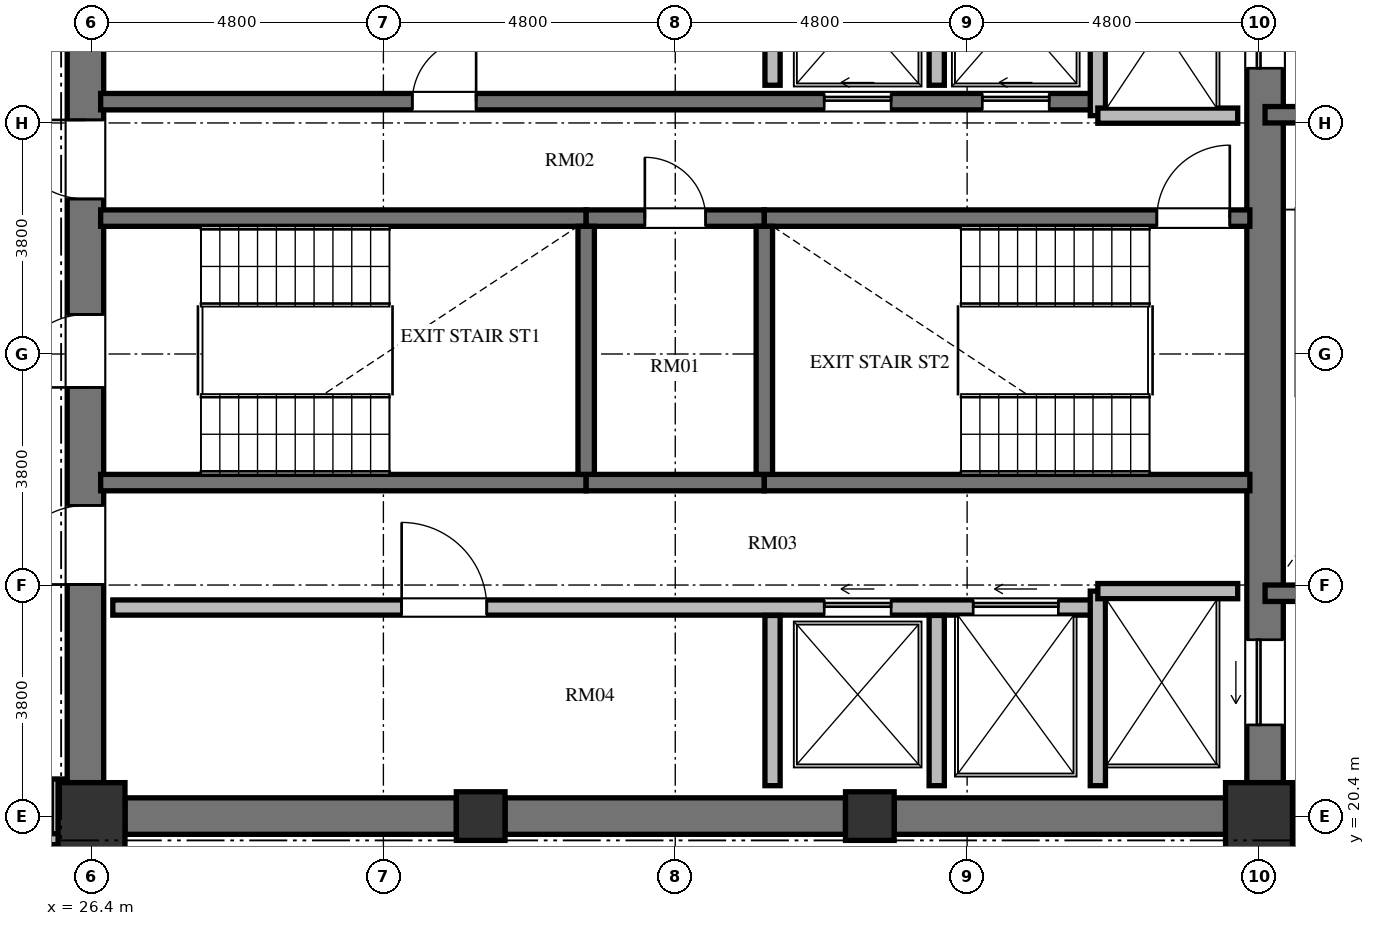
"""IFC4 building model, lengths in metres.
Left out: names, types, materials, properties, quantities, classifications, styles, units other than length and angle.
Written with IfcOpenShell. Run it as: python <this file> out.ifc"""

import sys

from ifc_helpers import new_model, si_unit, direction, frame, frame_2d, origin, origin_2d, place, context, subcontext, project, spatial, rectangle, extrude, element, fill, save


model = new_model("IFC4")
c1 = context("Model", 3, precision=1e-05, world=origin(), true_north=direction((0.0, 1.0)))
c2 = subcontext(c1, "Body", "Model", "MODEL_VIEW")
j1 = project(units=[si_unit("LENGTHUNIT", "METRE"), si_unit("PLANEANGLEUNIT", "RADIAN")], contexts=[c1])
p1 = place(None, origin())
s1 = spatial("IfcSite", under=j1, at=p1, CompositionType="ELEMENT")
p2 = place(p1, origin())
s2 = spatial("IfcBuilding", under=s1, at=p2, CompositionType="ELEMENT")
p3 = place(p2, frame((0.0, 0.0, 198.48)))
s3 = spatial("IfcBuildingStorey", under=s2, at=p3, CompositionType="ELEMENT", Elevation=198.48)
p4 = place(p3, frame((26.4, 20.4, 0.0), z_axis=(0.0, 0.0, 1.0), x_axis=(1.0, 0.0, 0.0)))
e1 = element("IfcColumn", 1, at=p4, inside=s3, PredefinedType="COLUMN", context=c2, shape_type="SweptSolid", body=[
    extrude(rectangle(XDim=1.1, YDim=1.1, at=origin_2d()), origin(), (0.0, 0.0, 1.0), 3.648),
])
for number, where, z_axis, x_axis in (
    (2, (32.8, 20.4, 0.0), (0.0, 0.0, 1.0), (1.0, 0.0, 0.0)),
    (3, (39.2, 20.4, 0.0), (0.0, 0.0, 1.0), (1.0, 0.0, 0.0)),
):
    element("IfcColumn", number, at=place(p3, frame(where, z_axis=z_axis, x_axis=x_axis)), inside=s3, PredefinedType="COLUMN", context=c2, shape_type="SweptSolid", body=[
        extrude(rectangle(XDim=0.8, YDim=0.8, at=origin_2d()), origin(), (0.0, 0.0, 1.0), 3.648),
    ])
p5 = place(p3, frame((45.6, 20.4, 0.0), z_axis=(0.0, 0.0, 1.0), x_axis=(1.0, 0.0, 0.0)))
e4 = element("IfcColumn", 4, at=p5, inside=s3, PredefinedType="COLUMN", context=c2, shape_type="SweptSolid", body=[
    extrude(rectangle(XDim=1.1, YDim=1.1, at=origin_2d()), origin(), (0.0, 0.0, 1.0), 3.648),
])
p6 = place(p3, frame((26.3, 20.95, 0.0), z_axis=(0.0, 0.0, 1.0), x_axis=(0.0, 1.0, 0.0)))
e5 = element("IfcWall", 5, at=p6, inside=s3, PredefinedType="SHEAR", context=c2, shape_type="SweptSolid", body=[
    extrude(rectangle(XDim=14.1, YDim=0.6, at=frame_2d((7.05, 0.0))), origin(), (0.0, 0.0, 1.0), 3.648),
])
p7 = place(p6, frame((6.5, 0.0, 0.0)))
e6 = element("IfcOpeningElement", 6, at=p7, cuts=e5, PredefinedType="OPENING", context=c2, shape_type="SweptSolid", body=[
    extrude(rectangle(XDim=1.2, YDim=2.15, at=frame_2d((0.6, 1.075))), frame((0.0, 0.31, 0.0), z_axis=(0.0, -1.0, 0.0), x_axis=(1.0, 0.0, 0.0)), (0.0, 0.0, 1.0), 0.62),
])
p8 = place(p6, frame((9.6, 0.0, 0.0)))
e7 = element("IfcOpeningElement", 7, at=p8, cuts=e5, PredefinedType="OPENING", context=c2, shape_type="SweptSolid", body=[
    extrude(rectangle(XDim=1.3, YDim=2.2, at=frame_2d((0.65, 1.1))), frame((0.0, 0.31, 0.0), z_axis=(0.0, -1.0, 0.0), x_axis=(1.0, 0.0, 0.0)), (0.0, 0.0, 1.0), 0.62),
])
p9 = place(p6, frame((3.26, 0.0, 0.0)))
e8 = element("IfcOpeningElement", 8, at=p9, cuts=e5, PredefinedType="OPENING", context=c2, shape_type="SweptSolid", body=[
    extrude(rectangle(XDim=1.3, YDim=2.2, at=frame_2d((0.65, 1.1))), frame((0.0, 0.31, 0.0), z_axis=(0.0, -1.0, 0.0), x_axis=(1.0, 0.0, 0.0)), (0.0, 0.0, 1.0), 0.62),
])
p10 = place(p3, frame((45.7, 20.95, 0.0), z_axis=(0.0, 0.0, 1.0), x_axis=(0.0, 1.0, 0.0)))
e9 = element("IfcWall", 9, at=p10, inside=s3, PredefinedType="SHEAR", context=c2, shape_type="SweptSolid", body=[
    extrude(rectangle(XDim=14.1, YDim=0.6, at=frame_2d((7.05, 0.0))), origin(), (0.0, 0.0, 1.0), 3.648),
])
p11 = place(p10, frame((11.75, 0.0, 0.0)))
e10 = element("IfcOpeningElement", 10, at=p11, cuts=e9, PredefinedType="OPENING", context=c2, shape_type="SweptSolid", body=[
    extrude(rectangle(XDim=1.4, YDim=2.3, at=frame_2d((0.7, 1.15))), frame((0.0, 0.31, 0.0), z_axis=(0.0, -1.0, 0.0), x_axis=(1.0, 0.0, 0.0)), (0.0, 0.0, 1.0), 0.62),
])
p12 = place(p10, frame((0.95, 0.0, 0.0)))
e11 = element("IfcOpeningElement", 11, at=p12, cuts=e9, PredefinedType="OPENING", context=c2, shape_type="SweptSolid", body=[
    extrude(rectangle(XDim=1.4, YDim=2.3, at=frame_2d((0.7, 1.15))), frame((0.0, 0.31, 0.0), z_axis=(0.0, -1.0, 0.0), x_axis=(1.0, 0.0, 0.0)), (0.0, 0.0, 1.0), 0.62),
])
p13 = place(p3, frame((26.95, 20.4, 0.0), z_axis=(0.0, 0.0, 1.0), x_axis=(1.0, 0.0, 0.0)))
e12 = element("IfcWall", 12, at=p13, inside=s3, PredefinedType="SHEAR", context=c2, shape_type="SweptSolid", body=[
    extrude(rectangle(XDim=5.45, YDim=0.6, at=frame_2d((2.725, 0.0))), origin(), (0.0, 0.0, 1.0), 3.648),
])
p14 = place(p3, frame((33.2, 20.4, 0.0), z_axis=(0.0, 0.0, 1.0), x_axis=(1.0, 0.0, 0.0)))
e13 = element("IfcWall", 13, at=p14, inside=s3, PredefinedType="SHEAR", context=c2, shape_type="SweptSolid", body=[
    extrude(rectangle(XDim=5.6, YDim=0.6, at=frame_2d((2.8, 0.0))), origin(), (0.0, 0.0, 1.0), 3.648),
])
p15 = place(p3, frame((39.6, 20.4, 0.0), z_axis=(0.0, 0.0, 1.0), x_axis=(1.0, 0.0, 0.0)))
e14 = element("IfcWall", 14, at=p15, inside=s3, PredefinedType="SHEAR", context=c2, shape_type="SweptSolid", body=[
    extrude(rectangle(XDim=5.45, YDim=0.6, at=frame_2d((2.725, 0.0))), origin(), (0.0, 0.0, 1.0), 3.648),
])
p16 = place(p3, frame((26.55, 30.235, 0.0), z_axis=(0.0, 0.0, 1.0), x_axis=(1.0, 0.0, 0.0)))
e15 = element("IfcWall", 15, at=p16, inside=s3, PredefinedType="SHEAR", context=c2, shape_type="SweptSolid", body=[
    extrude(rectangle(XDim=7.985, YDim=0.27, at=frame_2d((3.992, 0.0))), origin(), (0.0, 0.0, 1.0), 3.648),
])
p17 = place(p3, frame((34.535, 30.235, 0.0), z_axis=(0.0, 0.0, 1.0), x_axis=(1.0, 0.0, 0.0)))
e16 = element("IfcWall", 16, at=p17, inside=s3, PredefinedType="SHEAR", context=c2, shape_type="SweptSolid", body=[
    extrude(rectangle(XDim=2.93, YDim=0.27, at=frame_2d((1.465, 0.0))), origin(), (0.0, 0.0, 1.0), 3.648),
])
p18 = place(p17, frame((0.965, 0.0, 0.0)))
e17 = element("IfcOpeningElement", 17, at=p18, cuts=e16, PredefinedType="OPENING", context=c2, shape_type="SweptSolid", body=[
    extrude(rectangle(XDim=1.0, YDim=2.1, at=frame_2d((0.5, 1.05))), frame((0.0, 0.145, 0.0), z_axis=(0.0, -1.0, 0.0), x_axis=(1.0, 0.0, 0.0)), (0.0, 0.0, 1.0), 0.29),
])
p19 = place(p3, frame((37.465, 30.235, 0.0), z_axis=(0.0, 0.0, 1.0), x_axis=(1.0, 0.0, 0.0)))
e18 = element("IfcWall", 18, at=p19, inside=s3, PredefinedType="SHEAR", context=c2, shape_type="SweptSolid", body=[
    extrude(rectangle(XDim=7.985, YDim=0.27, at=frame_2d((3.992, 0.0))), origin(), (0.0, 0.0, 1.0), 3.648),
])
p20 = place(p19, frame((6.455, 0.0, 0.0)))
e19 = element("IfcOpeningElement", 19, at=p20, cuts=e18, PredefinedType="OPENING", context=c2, shape_type="SweptSolid", body=[
    extrude(rectangle(XDim=1.2, YDim=2.15, at=frame_2d((0.6, 1.075))), frame((0.0, 0.145, 0.0), z_axis=(0.0, -1.0, 0.0), x_axis=(1.0, 0.0, 0.0)), (0.0, 0.0, 1.0), 0.29),
])
p21 = place(p3, frame((26.55, 25.885, 0.0), z_axis=(0.0, 0.0, 1.0), x_axis=(1.0, 0.0, 0.0)))
e20 = element("IfcWall", 20, at=p21, inside=s3, PredefinedType="SHEAR", context=c2, shape_type="SweptSolid", body=[
    extrude(rectangle(XDim=7.985, YDim=0.27, at=frame_2d((3.992, 0.0))), origin(), (0.0, 0.0, 1.0), 3.648),
])
p22 = place(p3, frame((34.535, 25.885, 0.0), z_axis=(0.0, 0.0, 1.0), x_axis=(1.0, 0.0, 0.0)))
e21 = element("IfcWall", 21, at=p22, inside=s3, PredefinedType="SHEAR", context=c2, shape_type="SweptSolid", body=[
    extrude(rectangle(XDim=2.93, YDim=0.27, at=frame_2d((1.465, 0.0))), origin(), (0.0, 0.0, 1.0), 3.648),
])
p23 = place(p3, frame((37.465, 25.885, 0.0), z_axis=(0.0, 0.0, 1.0), x_axis=(1.0, 0.0, 0.0)))
e22 = element("IfcWall", 22, at=p23, inside=s3, PredefinedType="SHEAR", context=c2, shape_type="SweptSolid", body=[
    extrude(rectangle(XDim=7.985, YDim=0.27, at=frame_2d((3.992, 0.0))), origin(), (0.0, 0.0, 1.0), 3.648),
])
for number, where, z_axis, x_axis in (
    (23, (34.535, 26.02, 0.0), (0.0, 0.0, 1.0), (0.0, 1.0, 0.0)),
    (24, (37.465, 26.02, 0.0), (0.0, 0.0, 1.0), (0.0, 1.0, 0.0)),
):
    element("IfcWall", number, at=place(p3, frame(where, z_axis=z_axis, x_axis=x_axis)), inside=s3, PredefinedType="SHEAR", context=c2, shape_type="SweptSolid", body=[
        extrude(rectangle(XDim=4.08, YDim=0.27, at=frame_2d((2.04, 0.0))), origin(), (0.0, 0.0, 1.0), 3.648),
    ])
p24 = place(p3, frame((26.55, 32.15, 0.0), z_axis=(0.0, 0.0, 1.0), x_axis=(1.0, 0.0, 0.0)))
e25 = element("IfcWall", 25, at=p24, inside=s3, PredefinedType="SHEAR", context=c2, shape_type="SweptSolid", body=[
    extrude(rectangle(XDim=16.4, YDim=0.27, at=frame_2d((8.2, 0.0))), origin(), (0.0, 0.0, 1.0), 3.648),
])
p25 = place(p24, frame((5.125, 0.0, 0.0)))
e26 = element("IfcOpeningElement", 26, at=p25, cuts=e25, PredefinedType="OPENING", context=c2, shape_type="SweptSolid", body=[
    extrude(rectangle(XDim=1.05, YDim=2.15, at=frame_2d((0.525, 1.075))), frame((0.0, 0.145, 0.0), z_axis=(0.0, -1.0, 0.0), x_axis=(1.0, 0.0, 0.0)), (0.0, 0.0, 1.0), 0.29),
])
p26 = place(p24, frame((11.9, 0.0, 0.0)))
e27 = element("IfcOpeningElement", 27, at=p26, cuts=e25, PredefinedType="OPENING", context=c2, shape_type="SweptSolid", body=[
    extrude(rectangle(XDim=1.1, YDim=2.2, at=frame_2d((0.55, 1.1))), frame((0.0, 0.145, 0.0), z_axis=(0.0, -1.0, 0.0), x_axis=(1.0, 0.0, 0.0)), (0.0, 0.0, 1.0), 0.29),
])
p27 = place(p24, frame((14.5, 0.0, 0.0)))
e28 = element("IfcOpeningElement", 28, at=p27, cuts=e25, PredefinedType="OPENING", context=c2, shape_type="SweptSolid", body=[
    extrude(rectangle(XDim=1.1, YDim=2.2, at=frame_2d((0.55, 1.1))), frame((0.0, 0.145, 0.0), z_axis=(0.0, -1.0, 0.0), x_axis=(1.0, 0.0, 0.0)), (0.0, 0.0, 1.0), 0.29),
])
p28 = place(p3, frame((26.75, 23.83, 0.0), z_axis=(0.0, 0.0, 1.0), x_axis=(1.0, 0.0, 0.0)))
e29 = element("IfcWall", 29, at=p28, inside=s3, PredefinedType="SOLIDWALL", context=c2, shape_type="SweptSolid", body=[
    extrude(rectangle(XDim=16.2, YDim=0.25, at=frame_2d((8.1, 0.0))), origin(), (0.0, 0.0, 1.0), 3.448),
])
p29 = place(p28, frame((4.75, 0.0, 0.0)))
e30 = element("IfcOpeningElement", 30, at=p29, cuts=e29, PredefinedType="OPENING", context=c2, shape_type="SweptSolid", body=[
    extrude(rectangle(XDim=1.4, YDim=2.2, at=frame_2d((0.7, 1.1))), frame((0.0, 0.135, 0.0), z_axis=(0.0, -1.0, 0.0), x_axis=(1.0, 0.0, 0.0)), (0.0, 0.0, 1.0), 0.27),
])
p30 = place(p28, frame((11.7, 0.0, 0.0)))
e31 = element("IfcOpeningElement", 31, at=p30, cuts=e29, PredefinedType="OPENING", context=c2, shape_type="SweptSolid", body=[
    extrude(rectangle(XDim=1.1, YDim=2.2, at=frame_2d((0.55, 1.1))), frame((0.0, 0.135, 0.0), z_axis=(0.0, -1.0, 0.0), x_axis=(1.0, 0.0, 0.0)), (0.0, 0.0, 1.0), 0.27),
])
p31 = place(p28, frame((14.15, 0.0, 0.0)))
e32 = element("IfcOpeningElement", 32, at=p31, cuts=e29, PredefinedType="OPENING", context=c2, shape_type="SweptSolid", body=[
    extrude(rectangle(XDim=1.4, YDim=2.3, at=frame_2d((0.7, 1.15))), frame((0.0, 0.135, 0.0), z_axis=(0.0, -1.0, 0.0), x_axis=(1.0, 0.0, 0.0)), (0.0, 0.0, 1.0), 0.27),
])
p32 = place(p3, frame((42.95, 31.92, 0.0), z_axis=(0.0, 0.0, 1.0), x_axis=(0.0, 1.0, 0.0)))
e33 = element("IfcWall", 33, at=p32, inside=s3, PredefinedType="SOLIDWALL", context=c2, shape_type="SweptSolid", body=[
    extrude(rectangle(XDim=3.18, YDim=0.25, at=frame_2d((1.59, 0.0))), origin(), (0.0, 0.0, 1.0), 3.448),
])
p33 = place(p3, frame((42.95, 31.92, 0.0), z_axis=(0.0, 0.0, 1.0), x_axis=(1.0, 0.0, 0.0)))
e34 = element("IfcWall", 34, at=p33, inside=s3, PredefinedType="SOLIDWALL", context=c2, shape_type="SweptSolid", body=[
    extrude(rectangle(XDim=2.3, YDim=0.25, at=frame_2d((1.15, 0.0))), origin(), (0.0, 0.0, 1.0), 3.448),
])
p34 = place(p3, frame((42.95, 20.9, 0.0), z_axis=(0.0, 0.0, 1.0), x_axis=(0.0, 1.0, 0.0)))
e35 = element("IfcWall", 35, at=p34, inside=s3, PredefinedType="SOLIDWALL", context=c2, shape_type="SweptSolid", body=[
    extrude(rectangle(XDim=3.2, YDim=0.25, at=frame_2d((1.6, 0.0))), origin(), (0.0, 0.0, 1.0), 3.448),
])
p35 = place(p3, frame((42.95, 24.1, 0.0), z_axis=(0.0, 0.0, 1.0), x_axis=(1.0, 0.0, 0.0)))
e36 = element("IfcWall", 36, at=p35, inside=s3, PredefinedType="SOLIDWALL", context=c2, shape_type="SweptSolid", body=[
    extrude(rectangle(XDim=2.3, YDim=0.25, at=frame_2d((1.15, 0.0))), origin(), (0.0, 0.0, 1.0), 3.448),
])
p36 = place(p3, frame((37.6, 32.42, 0.0), z_axis=(0.0, 0.0, 1.0), x_axis=(0.0, 1.0, 0.0)))
e37 = element("IfcWall", 37, at=p36, inside=s3, PredefinedType="SOLIDWALL", context=c2, shape_type="SweptSolid", body=[
    extrude(rectangle(XDim=2.68, YDim=0.25, at=frame_2d((1.34, 0.0))), origin(), (0.0, 0.0, 1.0), 3.448),
])
p37 = place(p3, frame((37.6, 20.9, 0.0), z_axis=(0.0, 0.0, 1.0), x_axis=(0.0, 1.0, 0.0)))
e38 = element("IfcWall", 38, at=p37, inside=s3, PredefinedType="SOLIDWALL", context=c2, shape_type="SweptSolid", body=[
    extrude(rectangle(XDim=2.8, YDim=0.25, at=frame_2d((1.4, 0.0))), origin(), (0.0, 0.0, 1.0), 3.448),
])
p38 = place(p3, frame((40.3, 32.42, 0.0), z_axis=(0.0, 0.0, 1.0), x_axis=(0.0, 1.0, 0.0)))
e39 = element("IfcWall", 39, at=p38, inside=s3, PredefinedType="SOLIDWALL", context=c2, shape_type="SweptSolid", body=[
    extrude(rectangle(XDim=2.68, YDim=0.25, at=frame_2d((1.34, 0.0))), origin(), (0.0, 0.0, 1.0), 3.448),
])
p39 = place(p3, frame((40.3, 20.9, 0.0), z_axis=(0.0, 0.0, 1.0), x_axis=(0.0, 1.0, 0.0)))
e40 = element("IfcWall", 40, at=p39, inside=s3, PredefinedType="SOLIDWALL", context=c2, shape_type="SweptSolid", body=[
    extrude(rectangle(XDim=2.8, YDim=0.25, at=frame_2d((1.4, 0.0))), origin(), (0.0, 0.0, 1.0), 3.448),
])
for number, where, z_axis, x_axis in (
    (41, (45.7, 31.935, 0.0), (0.0, 0.0, 1.0), (1.0, 0.0, 0.0)),
    (42, (45.7, 24.065, 0.0), (0.0, 0.0, 1.0), (1.0, 0.0, 0.0)),
):
    element("IfcWall", number, at=place(p3, frame(where, z_axis=z_axis, x_axis=x_axis)), inside=s3, PredefinedType="SHEAR", context=c2, shape_type="SweptSolid", body=[
        extrude(rectangle(XDim=4.715, YDim=0.27, at=frame_2d((2.357, 0.0))), origin(), (0.0, 0.0, 1.0), 3.648),
    ])
p40 = place(p3, frame((45.7, 20.02, 0.0), z_axis=(0.0, 0.0, 1.0), x_axis=(1.0, 0.0, 0.0)))
e43 = element("IfcWall", 43, at=p40, inside=s3, PredefinedType="SOLIDWALL", context=c2, shape_type="SweptSolid", body=[
    extrude(rectangle(XDim=4.715, YDim=0.25, at=frame_2d((2.357, 0.0))), origin(), (0.0, 0.0, 1.0), 3.448),
])
p41 = place(p3, frame((25.83, 21.01, 0.0), z_axis=(0.0, 0.0, 1.0), x_axis=(0.0, -1.0, 0.0)))
e44 = element("IfcWall", 44, at=p41, inside=s3, PredefinedType="PARTITIONING", context=c2, shape_type="SweptSolid", body=[
    extrude(rectangle(XDim=1.03, YDim=0.18, at=frame_2d((0.515, 0.0))), origin(), (0.0, 0.0, 1.0), 3.448),
])
p42 = place(p3, frame((25.87, 20.02, 0.0), z_axis=(0.0, 0.0, 1.0), x_axis=(-1.0, 0.0, 0.0)))
e45 = element("IfcWall", 45, at=p42, inside=s3, PredefinedType="PARTITIONING", context=c2, shape_type="SweptSolid", body=[
    extrude(rectangle(XDim=2.56, YDim=0.18, at=frame_2d((1.28, 0.0))), origin(), (0.0, 0.0, 1.0), 3.448),
])
p43 = place(p7, origin())
e46 = element("IfcDoor", 46, at=p43, inside=s3, OperationType="SINGLE_SWING_LEFT", PredefinedType="DOOR", context=c2, shape_type="SweptSolid", body=[
    extrude(rectangle(XDim=1.2, YDim=2.15, at=frame_2d((0.6, 1.075))), frame((0.0, 0.025, 0.0), z_axis=(0.0, -1.0, 0.0), x_axis=(1.0, 0.0, 0.0)), (0.0, 0.0, 1.0), 0.05),
])
fill(e6, e46)
p44 = place(p20, origin())
e47 = element("IfcDoor", 47, at=p44, inside=s3, OperationType="SINGLE_SWING_RIGHT", PredefinedType="DOOR", context=c2, shape_type="SweptSolid", body=[
    extrude(rectangle(XDim=1.2, YDim=2.15, at=frame_2d((0.6, 1.075))), frame((0.0, 0.025, 0.0), z_axis=(0.0, -1.0, 0.0), x_axis=(1.0, 0.0, 0.0)), (0.0, 0.0, 1.0), 0.05),
])
fill(e19, e47)
p45 = place(p18, origin())
e48 = element("IfcDoor", 48, at=p45, inside=s3, OperationType="SINGLE_SWING_LEFT", PredefinedType="DOOR", context=c2, shape_type="SweptSolid", body=[
    extrude(rectangle(XDim=1.0, YDim=2.1, at=frame_2d((0.5, 1.05))), frame((0.0, 0.025, 0.0), z_axis=(0.0, -1.0, 0.0), x_axis=(1.0, 0.0, 0.0)), (0.0, 0.0, 1.0), 0.05),
])
fill(e17, e48)
p46 = place(p8, origin())
e49 = element("IfcDoor", 49, at=p46, inside=s3, OperationType="SINGLE_SWING_RIGHT", PredefinedType="DOOR", context=c2, shape_type="SweptSolid", body=[
    extrude(rectangle(XDim=1.3, YDim=2.2, at=frame_2d((0.65, 1.1))), frame((0.0, 0.025, 0.0), z_axis=(0.0, -1.0, 0.0), x_axis=(1.0, 0.0, 0.0)), (0.0, 0.0, 1.0), 0.05),
])
fill(e7, e49)
p47 = place(p9, origin())
e50 = element("IfcDoor", 50, at=p47, inside=s3, OperationType="SINGLE_SWING_LEFT", PredefinedType="DOOR", context=c2, shape_type="SweptSolid", body=[
    extrude(rectangle(XDim=1.3, YDim=2.2, at=frame_2d((0.65, 1.1))), frame((0.0, 0.025, 0.0), z_axis=(0.0, -1.0, 0.0), x_axis=(1.0, 0.0, 0.0)), (0.0, 0.0, 1.0), 0.05),
])
fill(e8, e50)
p48 = place(p25, origin())
e51 = element("IfcDoor", 51, at=p48, inside=s3, OperationType="SINGLE_SWING_RIGHT", PredefinedType="DOOR", context=c2, shape_type="SweptSolid", body=[
    extrude(rectangle(XDim=1.05, YDim=2.15, at=frame_2d((0.525, 1.075))), frame((0.0, 0.025, 0.0), z_axis=(0.0, -1.0, 0.0), x_axis=(1.0, 0.0, 0.0)), (0.0, 0.0, 1.0), 0.05),
])
fill(e26, e51)
p49 = place(p29, origin())
e52 = element("IfcDoor", 52, at=p49, inside=s3, OperationType="SINGLE_SWING_LEFT", PredefinedType="DOOR", context=c2, shape_type="SweptSolid", body=[
    extrude(rectangle(XDim=1.4, YDim=2.2, at=frame_2d((0.7, 1.1))), frame((0.0, 0.025, 0.0), z_axis=(0.0, -1.0, 0.0), x_axis=(1.0, 0.0, 0.0)), (0.0, 0.0, 1.0), 0.05),
])
fill(e30, e52)
p50 = place(p26, origin())
e53 = element("IfcDoor", 53, at=p50, inside=s3, OperationType="SLIDING_TO_LEFT", PredefinedType="DOOR", context=c2, shape_type="SweptSolid", body=[
    extrude(rectangle(XDim=1.1, YDim=2.2, at=frame_2d((0.55, 1.1))), frame((0.0, 0.025, 0.0), z_axis=(0.0, -1.0, 0.0), x_axis=(1.0, 0.0, 0.0)), (0.0, 0.0, 1.0), 0.05),
])
fill(e27, e53)
p51 = place(p27, origin())
e54 = element("IfcDoor", 54, at=p51, inside=s3, OperationType="SLIDING_TO_LEFT", PredefinedType="DOOR", context=c2, shape_type="SweptSolid", body=[
    extrude(rectangle(XDim=1.1, YDim=2.2, at=frame_2d((0.55, 1.1))), frame((0.0, 0.025, 0.0), z_axis=(0.0, -1.0, 0.0), x_axis=(1.0, 0.0, 0.0)), (0.0, 0.0, 1.0), 0.05),
])
fill(e28, e54)
p52 = place(p30, origin())
e55 = element("IfcDoor", 55, at=p52, inside=s3, OperationType="SLIDING_TO_LEFT", PredefinedType="DOOR", context=c2, shape_type="SweptSolid", body=[
    extrude(rectangle(XDim=1.1, YDim=2.2, at=frame_2d((0.55, 1.1))), frame((0.0, 0.025, 0.0), z_axis=(0.0, -1.0, 0.0), x_axis=(1.0, 0.0, 0.0)), (0.0, 0.0, 1.0), 0.05),
])
fill(e31, e55)
p53 = place(p11, origin())
e56 = element("IfcDoor", 56, at=p53, inside=s3, OperationType="SLIDING_TO_LEFT", PredefinedType="DOOR", context=c2, shape_type="SweptSolid", body=[
    extrude(rectangle(XDim=1.4, YDim=2.3, at=frame_2d((0.7, 1.15))), frame((0.0, 0.025, 0.0), z_axis=(0.0, -1.0, 0.0), x_axis=(1.0, 0.0, 0.0)), (0.0, 0.0, 1.0), 0.05),
])
fill(e10, e56)
p54 = place(p12, origin())
e57 = element("IfcDoor", 57, at=p54, inside=s3, OperationType="SLIDING_TO_LEFT", PredefinedType="DOOR", context=c2, shape_type="SweptSolid", body=[
    extrude(rectangle(XDim=1.4, YDim=2.3, at=frame_2d((0.7, 1.15))), frame((0.0, 0.025, 0.0), z_axis=(0.0, -1.0, 0.0), x_axis=(1.0, 0.0, 0.0)), (0.0, 0.0, 1.0), 0.05),
])
fill(e11, e57)
p55 = place(p31, origin())
e58 = element("IfcDoor", 58, at=p55, inside=s3, OperationType="SLIDING_TO_LEFT", PredefinedType="DOOR", context=c2, shape_type="SweptSolid", body=[
    extrude(rectangle(XDim=1.4, YDim=2.3, at=frame_2d((0.7, 1.15))), frame((0.0, 0.025, 0.0), z_axis=(0.0, -1.0, 0.0), x_axis=(1.0, 0.0, 0.0)), (0.0, 0.0, 1.0), 0.05),
])
fill(e32, e58)
save(model, sys.argv[1])
